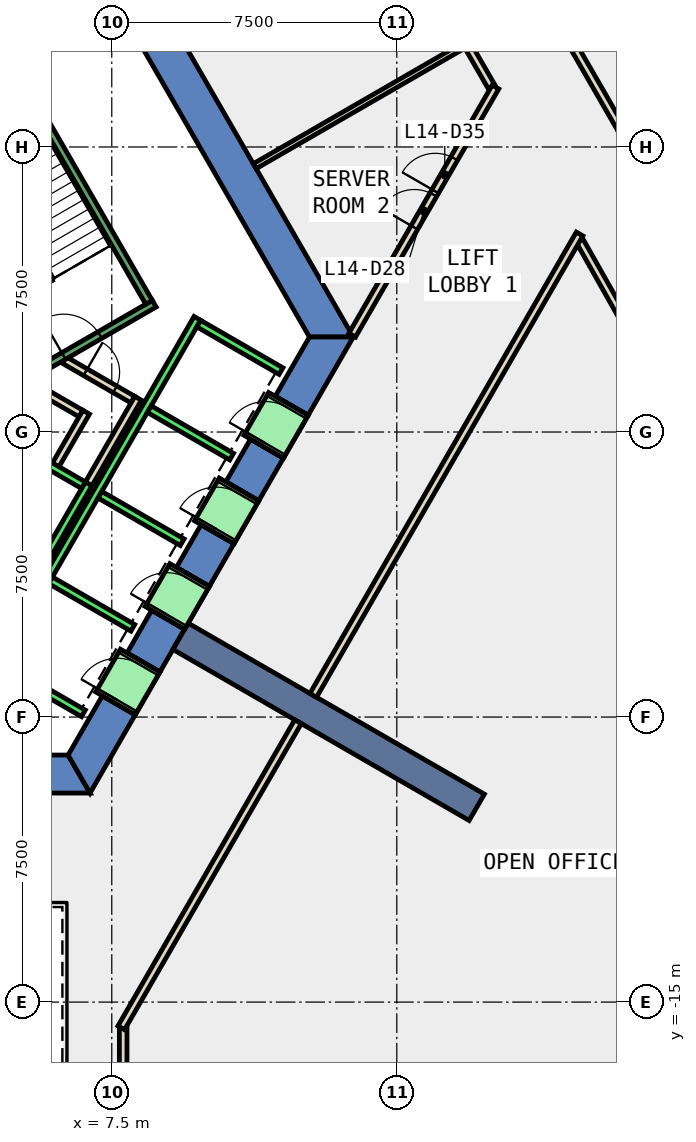
"""IFC4 building model, lengths in metres.
Left out: names, types, materials, properties, quantities, classifications, styles, units other than length and angle.
Written with IfcOpenShell. Run it as: python <this file> out.ifc"""

import sys

from ifc_helpers import new_model, si_unit, direction, frame, frame_2d, origin, place, context, subcontext, project, spatial, polyline, rectangle, outline, extrude, element, fill, save


model = new_model("IFC4")
c1 = context("Model", 3, precision=1e-05, world=origin(), true_north=direction((0.0, 1.0)))
c2 = subcontext(c1, "Body", "Model", "MODEL_VIEW")
j1 = project(units=[si_unit("LENGTHUNIT", "METRE"), si_unit("PLANEANGLEUNIT", "RADIAN")], contexts=[c1])
p1 = place(None, origin())
s1 = spatial("IfcSite", under=j1, at=p1, CompositionType="ELEMENT")
p2 = place(p1, origin())
s2 = spatial("IfcBuilding", under=s1, at=p2, CompositionType="ELEMENT")
p3 = place(p2, frame((0.0, 0.0, 68.6)))
s3 = spatial("IfcBuildingStorey", under=s2, at=p3, CompositionType="ELEMENT", Elevation=68.6)
p4 = place(p3, frame((0.0, 0.0, -0.4)))
e1 = element("IfcWall", 1, at=p4, inside=s3, PredefinedType="SHEAR", context=c2, shape_type="SweptSolid", body=[
    extrude(outline(polyline([(8.517, 11.748), (7.651, 11.248), (12.702, 2.5), (13.856, 2.5), (8.517, 11.748)])), origin(), (0.0, 0.0, 1.0), 4.2),
])
p5 = place(p3, frame((0.0, 0.0, -0.4)))
e2 = element("IfcWall", 2, at=p5, inside=s3, PredefinedType="SHEAR", context=c2, shape_type="SweptSolid", body=[
    extrude(outline(polyline([(5.75, -8.5), (5.75, -9.5), (6.928, -9.5), (6.351, -8.5), (5.75, -8.5)])), origin(), (0.0, 0.0, 1.0), 4.2),
])
p6 = place(p3, frame((0.0, 0.0, -0.4)))
e3 = element("IfcWall", 3, at=p6, inside=s3, PredefinedType="SHEAR", context=c2, shape_type="SweptSolid", body=[
    extrude(outline(polyline([(8.117, -7.44), (7.252, -6.94), (6.351, -8.5), (6.928, -9.5), (8.117, -7.44)])), origin(), (0.0, 0.0, 1.0), 4.2),
])
p7 = place(p3, frame((0.0, 0.0, -0.4)))
e4 = element("IfcWall", 4, at=p7, inside=s3, PredefinedType="SHEAR", context=c2, shape_type="SweptSolid", body=[
    extrude(outline(polyline([(9.417, -5.189), (8.551, -4.689), (7.902, -5.814), (8.767, -6.314), (9.417, -5.189)])), origin(), (0.0, 0.0, 1.0), 4.2),
])
p8 = place(p3, frame((0.0, 0.0, -0.4)))
e5 = element("IfcWall", 5, at=p8, inside=s3, PredefinedType="SHEAR", context=c2, shape_type="SweptSolid", body=[
    extrude(outline(polyline([(10.717, -2.937), (9.851, -2.437), (9.201, -3.563), (10.067, -4.063), (10.717, -2.937)])), origin(), (0.0, 0.0, 1.0), 4.2),
])
p9 = place(p3, frame((0.0, 0.0, -0.4)))
e6 = element("IfcWall", 6, at=p9, inside=s3, PredefinedType="SHEAR", context=c2, shape_type="SweptSolid", body=[
    extrude(outline(polyline([(12.017, -0.686), (11.151, -0.186), (10.501, -1.311), (11.367, -1.811), (12.017, -0.686)])), origin(), (0.0, 0.0, 1.0), 4.2),
])
p10 = place(p3, frame((0.0, 0.0, -0.4)))
e7 = element("IfcWall", 7, at=p10, inside=s3, PredefinedType="SHEAR", context=c2, shape_type="SweptSolid", body=[
    extrude(outline(polyline([(11.801, 0.94), (12.667, 0.44), (13.856, 2.5), (12.702, 2.5), (11.801, 0.94)])), origin(), (0.0, 0.0, 1.0), 4.2),
])
p11 = place(p3, frame((0.0, 0.0, 3.6)))
e8 = element("IfcWall", 8, at=p11, inside=s3, PredefinedType="SHEAR", context=c2, shape_type="SweptSolid", body=[
    extrude(outline(polyline([(8.767, -6.314), (7.902, -5.814), (7.252, -6.94), (8.117, -7.44), (8.767, -6.314)])), origin(), (0.0, 0.0, 1.0), 0.2),
])
p12 = place(p3, frame((0.0, 0.0, 3.6)))
e9 = element("IfcWall", 9, at=p12, inside=s3, PredefinedType="SHEAR", context=c2, shape_type="SweptSolid", body=[
    extrude(outline(polyline([(10.067, -4.063), (9.201, -3.563), (8.551, -4.689), (9.417, -5.189), (10.067, -4.063)])), origin(), (0.0, 0.0, 1.0), 0.2),
])
p13 = place(p3, frame((0.0, 0.0, 3.6)))
e10 = element("IfcWall", 10, at=p13, inside=s3, PredefinedType="SHEAR", context=c2, shape_type="SweptSolid", body=[
    extrude(outline(polyline([(11.367, -1.811), (10.501, -1.311), (9.851, -2.437), (10.717, -2.937), (11.367, -1.811)])), origin(), (0.0, 0.0, 1.0), 0.2),
])
p14 = place(p3, frame((0.0, 0.0, 3.6)))
e11 = element("IfcWall", 11, at=p14, inside=s3, PredefinedType="SHEAR", context=c2, shape_type="SweptSolid", body=[
    extrude(outline(polyline([(12.667, 0.44), (11.801, 0.94), (11.151, -0.186), (12.017, -0.686), (12.667, 0.44)])), origin(), (0.0, 0.0, 1.0), 0.2),
])
p15 = place(p3, frame((9.31, -5.375, -0.4), z_axis=(0.0, 0.0, 1.0), x_axis=(0.866017533419, -0.500013631625, 0.0)))
e12 = element("IfcWall", 12, at=p15, inside=s3, PredefinedType="SHEAR", context=c2, shape_type="SweptSolid", body=[
    extrude(rectangle(XDim=9.0, YDim=0.8, at=frame_2d((4.5, 0.0))), origin(), (0.0, 0.0, 1.0), 4.2),
])
p16 = place(p3, frame((17.497, 9.078, 0.0), z_axis=(0.0, 0.0, 1.0), x_axis=(-0.500126451326, 0.865952384768, 0.0)))
e13 = element("IfcWall", 13, at=p16, inside=s3, PredefinedType="PARTITIONING", context=c2, shape_type="SweptSolid", body=[
    extrude(rectangle(XDim=1.238, YDim=0.2, at=frame_2d((0.619, 0.0))), origin(), (0.0, 0.0, 1.0), 3.8),
])
p17 = place(p3, frame((22.42, 0.415, 0.0), z_axis=(0.0, 0.0, 1.0), x_axis=(-0.491823859571, 0.870694717543, 0.0)))
e14 = element("IfcWall", 14, at=p17, inside=s3, PredefinedType="PARTITIONING", context=c2, shape_type="SweptSolid", body=[
    extrude(rectangle(XDim=5.309, YDim=0.2, at=frame_2d((2.654, 0.0))), origin(), (0.0, 0.0, 1.0), 3.8),
])
p18 = place(p3, frame((17.318, 14.187, 0.0), z_axis=(0.0, 0.0, 1.0), x_axis=(0.499986381413, -0.866033266336, 0.0)))
e15 = element("IfcWall", 15, at=p18, inside=s3, PredefinedType="PARTITIONING", context=c2, shape_type="SweptSolid", body=[
    extrude(rectangle(XDim=7.18, YDim=0.2, at=frame_2d((3.59, 0.0))), origin(), (0.0, 0.0, 1.0), 3.8),
])
p19 = place(p18, frame((3.165, 0.0, 0.0)))
e16 = element("IfcOpeningElement", 16, at=p19, cuts=e15, PredefinedType="OPENING", context=c2, shape_type="SweptSolid", body=[
    extrude(rectangle(XDim=1.0, YDim=2.1, at=frame_2d((0.5, 1.05))), frame((0.0, 0.11, 0.0), z_axis=(0.0, -1.0, 0.0), x_axis=(1.0, 0.0, 0.0)), (0.0, 0.0, 1.0), 0.22),
])
p20 = place(p3, frame((5.499, 1.172, 0.0), z_axis=(0.0, 0.0, 1.0), x_axis=(0.866333505267, -0.499465972466, 0.0)))
e17 = element("IfcWall", 17, at=p20, inside=s3, PredefinedType="PARTITIONING", context=c2, shape_type="SweptSolid", body=[
    extrude(rectangle(XDim=1.374, YDim=0.2, at=frame_2d((0.687, 0.0))), origin(), (0.0, 0.0, 1.0), 3.8),
])
p21 = place(p3, frame((6.826, 0.522, 0.0), z_axis=(0.0, 0.0, 1.0), x_axis=(-0.500016722714, -0.866015748706, 0.0)))
e18 = element("IfcWall", 18, at=p21, inside=s3, PredefinedType="PARTITIONING", context=c2, shape_type="SweptSolid", body=[
    extrude(rectangle(XDim=1.7, YDim=0.2, at=frame_2d((0.85, 0.0))), origin(), (0.0, 0.0, 1.0), 3.8),
])
p22 = place(p3, frame((6.25, 1.894, 0.0), z_axis=(0.0, 0.0, 1.0), x_axis=(0.866043184279, -0.499969202016, 0.0)))
e19 = element("IfcWall", 19, at=p22, inside=s3, PredefinedType="PARTITIONING", context=c2, shape_type="SweptSolid", body=[
    extrude(rectangle(XDim=2.084, YDim=0.2, at=frame_2d((1.042, 0.0))), origin(), (0.0, 0.0, 1.0), 3.8),
])
p23 = place(p22, frame((0.642, 0.0, 0.0)))
e20 = element("IfcOpeningElement", 20, at=p23, cuts=e19, PredefinedType="OPENING", context=c2, shape_type="SweptSolid", body=[
    extrude(rectangle(XDim=0.9, YDim=2.1, at=frame_2d((0.45, 1.05))), frame((0.0, 0.11, 0.0), z_axis=(0.0, -1.0, 0.0), x_axis=(1.0, 0.0, 0.0)), (0.0, 0.0, 1.0), 0.22),
])
p24 = place(p3, frame((8.192, 0.888, 0.0), z_axis=(0.0, 0.0, 1.0), x_axis=(-0.499940625693, -0.866059680843, 0.0)))
e21 = element("IfcWall", 21, at=p24, inside=s3, PredefinedType="PARTITIONING", context=c2, shape_type="SweptSolid", body=[
    extrude(rectangle(XDim=2.68, YDim=0.2, at=frame_2d((1.34, 0.0))), origin(), (0.0, 0.0, 1.0), 3.8),
])
p25 = place(p3, frame((11.261, 6.994, 0.0), z_axis=(0.0, 0.0, 1.0), x_axis=(0.866043905515, 0.499967952693, 0.0)))
e22 = element("IfcWall", 22, at=p25, inside=s3, PredefinedType="PARTITIONING", context=c2, shape_type="SweptSolid", body=[
    extrude(rectangle(XDim=6.542, YDim=0.15, at=frame_2d((3.271, 0.0))), origin(), (0.0, 0.0, 1.0), 3.8),
])
p26 = place(p3, frame((13.827, 2.55, 0.0), z_axis=(0.0, 0.0, 1.0), x_axis=(0.500116794417, 0.865957961995, 0.0)))
e23 = element("IfcWall", 23, at=p26, inside=s3, PredefinedType="PARTITIONING", context=c2, shape_type="SweptSolid", body=[
    extrude(rectangle(XDim=7.538, YDim=0.2, at=frame_2d((3.769, 0.0))), origin(), (0.0, 0.0, 1.0), 3.8),
])
p27 = place(p26, frame((3.269, 0.0, 0.0)))
e24 = element("IfcOpeningElement", 24, at=p27, cuts=e23, PredefinedType="OPENING", context=c2, shape_type="SweptSolid", body=[
    extrude(rectangle(XDim=1.0, YDim=2.1, at=frame_2d((0.5, 1.05))), frame((0.0, 0.11, 0.0), z_axis=(0.0, -1.0, 0.0), x_axis=(1.0, 0.0, 0.0)), (0.0, 0.0, 1.0), 0.22),
])
p28 = place(p26, frame((4.369, 0.0, 0.0)))
e25 = element("IfcOpeningElement", 25, at=p28, cuts=e23, PredefinedType="OPENING", context=c2, shape_type="SweptSolid", body=[
    extrude(rectangle(XDim=1.0, YDim=2.1, at=frame_2d((0.5, 1.05))), frame((0.0, 0.11, 0.0), z_axis=(0.0, -1.0, 0.0), x_axis=(1.0, 0.0, 0.0)), (0.0, 0.0, 1.0), 0.22),
])
p29 = place(p3, frame((7.8, -15.69, 0.0), z_axis=(0.0, 0.0, 1.0), x_axis=(0.0, -1.0, 0.0)))
e26 = element("IfcWall", 26, at=p29, inside=s3, PredefinedType="PARTITIONING", context=c2, shape_type="SweptSolid", body=[
    extrude(rectangle(XDim=3.87, YDim=0.2, at=frame_2d((1.935, 0.0))), origin(), (0.0, 0.0, 1.0), 3.8),
])
p30 = place(p3, frame((19.81, 5.211, 0.0), z_axis=(0.0, 0.0, 1.0), x_axis=(-0.500003368273, -0.866023459102, 0.0)))
e27 = element("IfcWall", 27, at=p30, inside=s3, PredefinedType="PARTITIONING", context=c2, shape_type="SweptSolid", body=[
    extrude(rectangle(XDim=14.018, YDim=0.2, at=frame_2d((7.009, 0.0))), origin(), (0.0, 0.0, 1.0), 3.8),
])
p31 = place(p3, frame((12.401, -7.622, 0.0), z_axis=(0.0, 0.0, 1.0), x_axis=(-0.500029185841, -0.866008552675, 0.0)))
e28 = element("IfcWall", 28, at=p31, inside=s3, PredefinedType="PARTITIONING", context=c2, shape_type="SweptSolid", body=[
    extrude(rectangle(XDim=9.301, YDim=0.2, at=frame_2d((4.651, 0.0))), origin(), (0.0, 0.0, 1.0), 3.8),
])
p32 = place(p3, frame((5.492, -3.788, 0.0), z_axis=(0.0, 0.0, 1.0), x_axis=(0.500011755427, 0.866018616679, 0.0)))
e29 = element("IfcWall", 29, at=p32, inside=s3, PredefinedType="STANDARD", context=c2, shape_type="SweptSolid", body=[
    extrude(rectangle(XDim=2.8, YDim=0.2, at=frame_2d((1.4, 0.0))), origin(), (0.0, 0.0, 1.0), 3.8),
])
p33 = place(p3, frame((4.677, -0.2, 0.0), z_axis=(0.0, 0.0, 1.0), x_axis=(0.865973769406, -0.500089422704, 0.0)))
e30 = element("IfcWall", 30, at=p33, inside=s3, PredefinedType="STANDARD", context=c2, shape_type="SweptSolid", body=[
    extrude(rectangle(XDim=2.399, YDim=0.2, at=frame_2d((1.2, 0.0))), origin(), (0.0, 0.0, 1.0), 3.8),
])
p34 = place(p3, frame((4.451, -6.19, 0.0), z_axis=(0.0, 0.0, 1.0), x_axis=(0.50000090737, 0.866024879913, 0.0)))
e31 = element("IfcWall", 31, at=p34, inside=s3, PredefinedType="STANDARD", context=c2, shape_type="SweptSolid", body=[
    extrude(rectangle(XDim=10.6, YDim=0.2, at=frame_2d((5.3, 0.0))), origin(), (0.0, 0.0, 1.0), 3.8),
])
for number, where, z_axis, x_axis in (
    (32, (4.588, -6.153, 0.0), (0.0, 0.0, 1.0), (0.866, -0.5, 0.0)),
    (33, (5.888, -3.902, 0.0), (0.0, 0.0, 1.0), (0.866, -0.5, 0.0)),
    (34, (7.188, -1.65, 0.0), (0.0, 0.0, 1.0), (0.866, -0.5, 0.0)),
    (35, (8.488, 0.602, 0.0), (0.0, 0.0, 1.0), (0.866, -0.5, 0.0)),
):
    element("IfcWall", number, at=place(p3, frame(where, z_axis=z_axis, x_axis=x_axis)), inside=s3, PredefinedType="STANDARD", context=c2, shape_type="SweptSolid", body=[
        extrude(rectangle(XDim=2.5, YDim=0.2, at=frame_2d((1.25, 0.0))), origin(), (0.0, 0.0, 1.0), 3.8),
    ])
p35 = place(p3, frame((9.788, 2.853, 0.0), z_axis=(0.0, 0.0, 1.0), x_axis=(0.865998541277, -0.500046524342, 0.0)))
e36 = element("IfcWall", 36, at=p35, inside=s3, PredefinedType="STANDARD", context=c2, shape_type="SweptSolid", body=[
    extrude(rectangle(XDim=2.5, YDim=0.2, at=frame_2d((1.25, 0.0))), origin(), (0.0, 0.0, 1.0), 3.8),
])
p36 = place(p3, frame((7.598, -7.14, 0.0), z_axis=(0.0, 0.0, 1.0), x_axis=(0.500362116554, 0.865816234728, 0.0)))
e37 = element("IfcWall", 37, at=p36, inside=s3, PredefinedType="STANDARD", context=c2, shape_type="SweptSolid", body=[
    extrude(rectangle(XDim=1.299, YDim=1.2, at=frame_2d((0.65, 0.0))), origin(), (0.0, 0.0, 1.0), 2.4),
])
p37 = place(p36, frame((0.1, 0.0, 0.0)))
e38 = element("IfcOpeningElement", 38, at=p37, cuts=e37, PredefinedType="OPENING", context=c2, shape_type="SweptSolid", body=[
    extrude(rectangle(XDim=1.1, YDim=2.3, at=frame_2d((0.55, 1.15))), frame((0.0, 0.61, 0.0), z_axis=(0.0, -1.0, 0.0), x_axis=(1.0, 0.0, 0.0)), (0.0, 0.0, 1.0), 1.22),
])
p38 = place(p3, frame((8.898, -4.889, 0.0), z_axis=(0.0, 0.0, 1.0), x_axis=(0.500036693733, 0.866004217611, 0.0)))
e39 = element("IfcWall", 39, at=p38, inside=s3, PredefinedType="STANDARD", context=c2, shape_type="SweptSolid", body=[
    extrude(rectangle(XDim=1.3, YDim=1.2, at=frame_2d((0.65, 0.0))), origin(), (0.0, 0.0, 1.0), 2.4),
])
p39 = place(p38, frame((0.1, 0.0, 0.0)))
e40 = element("IfcOpeningElement", 40, at=p39, cuts=e39, PredefinedType="OPENING", context=c2, shape_type="SweptSolid", body=[
    extrude(rectangle(XDim=1.1, YDim=2.3, at=frame_2d((0.55, 1.15))), frame((0.0, 0.61, 0.0), z_axis=(0.0, -1.0, 0.0), x_axis=(1.0, 0.0, 0.0)), (0.0, 0.0, 1.0), 1.22),
])
p40 = place(p3, frame((10.198, -2.637, 0.0), z_axis=(0.0, 0.0, 1.0), x_axis=(0.49989585183, 0.866085525409, 0.0)))
e41 = element("IfcWall", 41, at=p40, inside=s3, PredefinedType="STANDARD", context=c2, shape_type="SweptSolid", body=[
    extrude(rectangle(XDim=1.3, YDim=1.2, at=frame_2d((0.65, 0.0))), origin(), (0.0, 0.0, 1.0), 2.4),
])
p41 = place(p40, frame((0.1, 0.0, 0.0)))
e42 = element("IfcOpeningElement", 42, at=p41, cuts=e41, PredefinedType="OPENING", context=c2, shape_type="SweptSolid", body=[
    extrude(rectangle(XDim=1.1, YDim=2.3, at=frame_2d((0.55, 1.15))), frame((0.0, 0.61, 0.0), z_axis=(0.0, -1.0, 0.0), x_axis=(1.0, 0.0, 0.0)), (0.0, 0.0, 1.0), 1.22),
])
p42 = place(p3, frame((11.498, -0.385, 0.0), z_axis=(0.0, 0.0, 1.0), x_axis=(0.500221244143, 0.865897630733, 0.0)))
e43 = element("IfcWall", 43, at=p42, inside=s3, PredefinedType="STANDARD", context=c2, shape_type="SweptSolid", body=[
    extrude(rectangle(XDim=1.299, YDim=1.2, at=frame_2d((0.65, 0.0))), origin(), (0.0, 0.0, 1.0), 2.4),
])
p43 = place(p42, frame((0.1, 0.0, 0.0)))
e44 = element("IfcOpeningElement", 44, at=p43, cuts=e43, PredefinedType="OPENING", context=c2, shape_type="SweptSolid", body=[
    extrude(rectangle(XDim=1.1, YDim=2.3, at=frame_2d((0.55, 1.15))), frame((0.0, 0.61, 0.0), z_axis=(0.0, -1.0, 0.0), x_axis=(1.0, 0.0, 0.0)), (0.0, 0.0, 1.0), 1.22),
])
p44 = place(p3, frame((4.806, 1.176, 0.0), z_axis=(0.0, 0.0, 1.0), x_axis=(0.866059941101, 0.499940174841, 0.0)))
e45 = element("IfcWall", 45, at=p44, inside=s3, PredefinedType="STANDARD", context=c2, shape_type="SweptSolid", body=[
    extrude(rectangle(XDim=4.4, YDim=0.2, at=frame_2d((2.2, 0.0))), origin(), (0.0, 0.0, 1.0), 3.8),
])
p45 = place(p44, frame((1.65, 0.0, 0.0)))
e46 = element("IfcOpeningElement", 46, at=p45, cuts=e45, PredefinedType="OPENING", context=c2, shape_type="SweptSolid", body=[
    extrude(rectangle(XDim=1.1, YDim=2.2, at=frame_2d((0.55, 1.1))), frame((0.0, 0.11, 0.0), z_axis=(0.0, -1.0, 0.0), x_axis=(1.0, 0.0, 0.0)), (0.0, 0.0, 1.0), 0.22),
])
p46 = place(p3, frame((8.48, 3.412, 0.0), z_axis=(0.0, 0.0, 1.0), x_axis=(-0.499978703459, 0.866037698999, 0.0)))
e47 = element("IfcWall", 47, at=p46, inside=s3, PredefinedType="STANDARD", context=c2, shape_type="SweptSolid", body=[
    extrude(rectangle(XDim=6.9, YDim=0.2, at=frame_2d((3.45, 0.0))), origin(), (0.0, 0.0, 1.0), 3.8),
])
p47 = place(p27, origin())
e48 = element("IfcDoor", 48, at=p47, inside=s3, OperationType="SINGLE_SWING_LEFT", PredefinedType="DOOR", context=c2, shape_type="SweptSolid", body=[
    extrude(rectangle(XDim=1.0, YDim=2.1, at=frame_2d((0.5, 1.05))), frame((0.0, 0.025, 0.0), z_axis=(0.0, -1.0, 0.0), x_axis=(1.0, 0.0, 0.0)), (0.0, 0.0, 1.0), 0.05),
])
fill(e24, e48)
p48 = place(p23, origin())
e49 = element("IfcDoor", 49, at=p48, inside=s3, OperationType="SINGLE_SWING_LEFT", PredefinedType="DOOR", context=c2, shape_type="SweptSolid", body=[
    extrude(rectangle(XDim=0.9, YDim=2.1, at=frame_2d((0.45, 1.05))), frame((0.0, 0.025, 0.0), z_axis=(0.0, -1.0, 0.0), x_axis=(1.0, 0.0, 0.0)), (0.0, 0.0, 1.0), 0.05),
])
fill(e20, e49)
p49 = place(p28, origin())
e50 = element("IfcDoor", 50, at=p49, inside=s3, OperationType="SINGLE_SWING_RIGHT", PredefinedType="DOOR", context=c2, shape_type="SweptSolid", body=[
    extrude(rectangle(XDim=1.0, YDim=2.1, at=frame_2d((0.5, 1.05))), frame((0.0, 0.025, 0.0), z_axis=(0.0, -1.0, 0.0), x_axis=(1.0, 0.0, 0.0)), (0.0, 0.0, 1.0), 0.05),
])
fill(e25, e50)
p50 = place(p37, origin())
e51 = element("IfcDoor", 51, at=p50, inside=s3, OperationType="SLIDING_TO_LEFT", PredefinedType="DOOR", context=c2, shape_type="SweptSolid", body=[
    extrude(rectangle(XDim=1.1, YDim=2.3, at=frame_2d((0.55, 1.15))), frame((0.0, 0.025, 0.0), z_axis=(0.0, -1.0, 0.0), x_axis=(1.0, 0.0, 0.0)), (0.0, 0.0, 1.0), 0.05),
])
fill(e38, e51)
p51 = place(p39, origin())
e52 = element("IfcDoor", 52, at=p51, inside=s3, OperationType="SLIDING_TO_LEFT", PredefinedType="DOOR", context=c2, shape_type="SweptSolid", body=[
    extrude(rectangle(XDim=1.1, YDim=2.3, at=frame_2d((0.55, 1.15))), frame((0.0, 0.025, 0.0), z_axis=(0.0, -1.0, 0.0), x_axis=(1.0, 0.0, 0.0)), (0.0, 0.0, 1.0), 0.05),
])
fill(e40, e52)
p52 = place(p41, origin())
e53 = element("IfcDoor", 53, at=p52, inside=s3, OperationType="SLIDING_TO_LEFT", PredefinedType="DOOR", context=c2, shape_type="SweptSolid", body=[
    extrude(rectangle(XDim=1.1, YDim=2.3, at=frame_2d((0.55, 1.15))), frame((0.0, 0.025, 0.0), z_axis=(0.0, -1.0, 0.0), x_axis=(1.0, 0.0, 0.0)), (0.0, 0.0, 1.0), 0.05),
])
fill(e42, e53)
p53 = place(p43, origin())
e54 = element("IfcDoor", 54, at=p53, inside=s3, OperationType="SLIDING_TO_LEFT", PredefinedType="DOOR", context=c2, shape_type="SweptSolid", body=[
    extrude(rectangle(XDim=1.1, YDim=2.3, at=frame_2d((0.55, 1.15))), frame((0.0, 0.025, 0.0), z_axis=(0.0, -1.0, 0.0), x_axis=(1.0, 0.0, 0.0)), (0.0, 0.0, 1.0), 0.05),
])
fill(e44, e54)
p54 = place(p45, origin())
e55 = element("IfcDoor", 55, at=p54, inside=s3, OperationType="SINGLE_SWING_LEFT", PredefinedType="DOOR", context=c2, shape_type="SweptSolid", body=[
    extrude(rectangle(XDim=1.1, YDim=2.2, at=frame_2d((0.55, 1.1))), frame((0.0, 0.025, 0.0), z_axis=(0.0, -1.0, 0.0), x_axis=(1.0, 0.0, 0.0)), (0.0, 0.0, 1.0), 0.05),
])
fill(e46, e55)
save(model, sys.argv[1])
